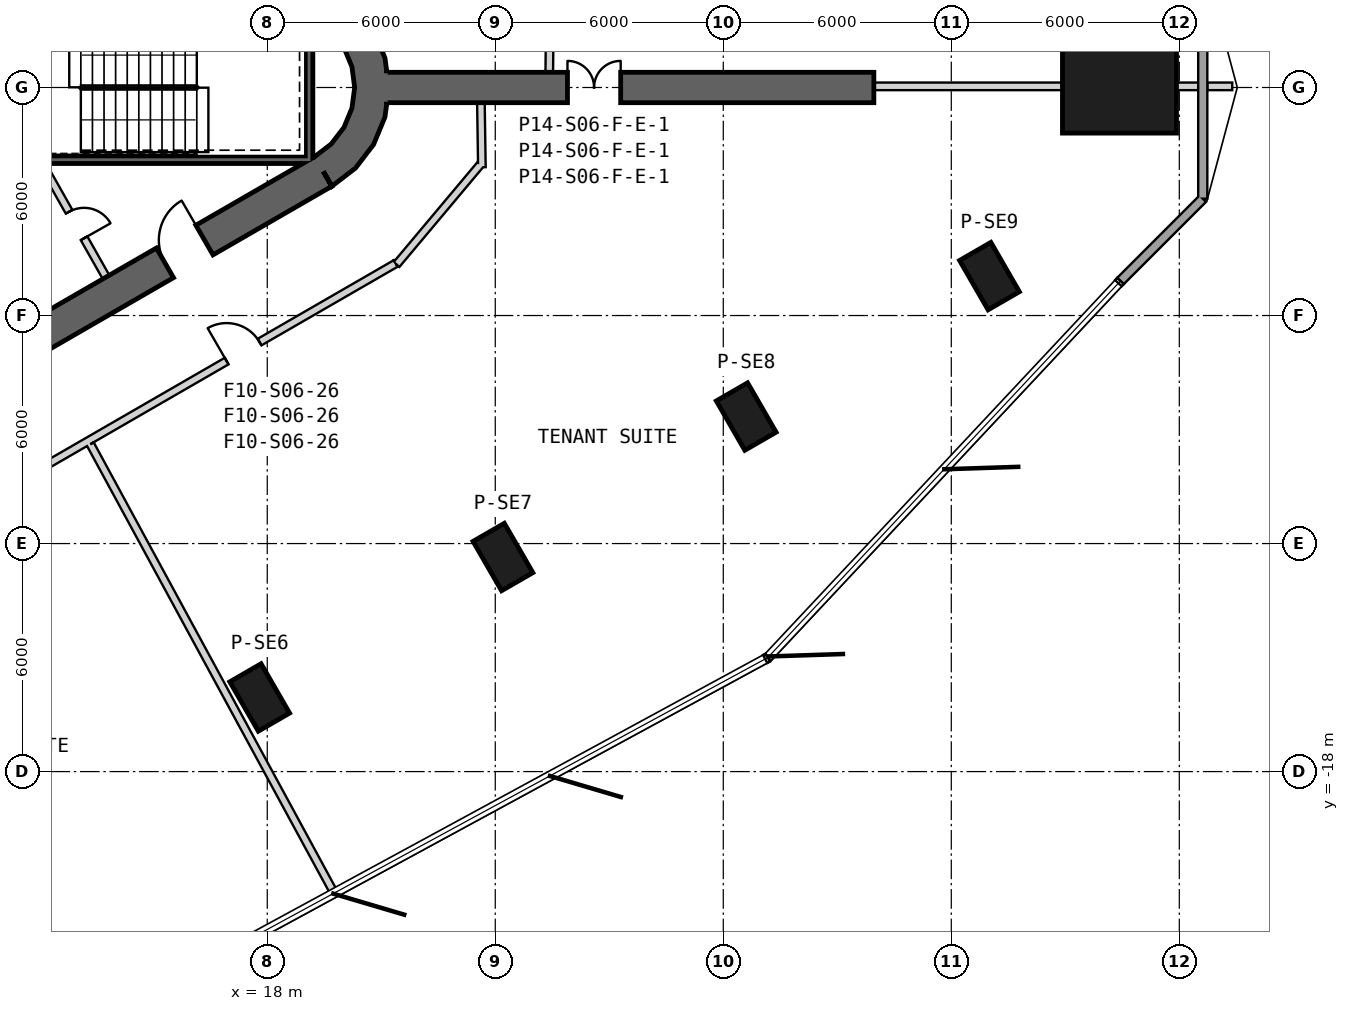
"""IFC4 building model, lengths in metres.
Left out: names, types, materials, properties, quantities, classifications, styles, units other than length and angle.
Written with IfcOpenShell. Run it as: python <this file> out.ifc"""

import sys

from ifc_helpers import new_model, si_unit, direction, frame, frame_2d, origin, origin_2d, place, context, subcontext, project, spatial, polyline, rectangle, outline, extrude, element, fill, save


model = new_model("IFC4")
c1 = context("Model", 3, precision=1e-05, world=origin(), true_north=direction((0.0, 1.0)))
c2 = subcontext(c1, "Body", "Model", "MODEL_VIEW")
j1 = project(units=[si_unit("LENGTHUNIT", "METRE"), si_unit("PLANEANGLEUNIT", "RADIAN")], contexts=[c1])
p1 = place(None, origin())
s1 = spatial("IfcSite", under=j1, at=p1, CompositionType="ELEMENT")
p2 = place(p1, origin())
s2 = spatial("IfcBuilding", under=s1, at=p2, CompositionType="ELEMENT")
p3 = place(p2, frame((0.0, 0.0, 119.3)))
s3 = spatial("IfcBuildingStorey", under=s2, at=p3, CompositionType="ELEMENT", Elevation=119.3)
p4 = place(p3, frame((40.425, 0.0, 0.0), z_axis=(0.0, 0.0, 1.0), x_axis=(1.0, 0.0, 0.0)))
e1 = element("IfcColumn", 1, at=p4, inside=s3, PredefinedType="COLUMN", context=c2, shape_type="SweptSolid", body=[
    extrude(rectangle(XDim=3.0, YDim=2.4, at=origin_2d()), origin(), (0.0, 0.0, 1.0), 4.1),
])
for number, where, z_axis, x_axis in (
    (2, (17.801, -16.05, 0.0), (0.0, 0.0, 1.0), (0.5, -0.866, 0.0)),
    (3, (24.202, -12.354, 0.0), (0.0, 0.0, 1.0), (0.5, -0.866, 0.0)),
    (4, (30.604, -8.658, 0.0), (0.0, 0.0, 1.0), (0.5, -0.866, 0.0)),
    (5, (37.005, -4.963, 0.0), (0.0, 0.0, 1.0), (0.5, -0.866, 0.0)),
):
    element("IfcColumn", number, at=place(p3, frame(where, z_axis=z_axis, x_axis=x_axis)), inside=s3, PredefinedType="COLUMN", context=c2, shape_type="SweptSolid", body=[
        extrude(rectangle(XDim=1.5, YDim=0.95, at=origin_2d()), origin(), (0.0, 0.0, 1.0), 4.1),
    ])
p5 = place(p3, frame((-7.825, -17.97, 0.0), z_axis=(0.0, 0.0, 1.0), x_axis=(0.866028369851, 0.499994862586, 0.0)))
e6 = element("IfcWall", 6, at=p5, inside=s3, PredefinedType="SHEAR", context=c2, shape_type="SweptSolid", body=[
    extrude(rectangle(XDim=31.523, YDim=0.9, at=frame_2d((15.762, 0.0))), origin(), (0.0, 0.0, 1.0), 4.1),
])
p6 = place(p5, frame((7.062, 0.0, 0.0)))
e7 = element("IfcOpeningElement", 7, at=p6, cuts=e6, PredefinedType="OPENING", context=c2, shape_type="SweptSolid", body=[
    extrude(rectangle(XDim=1.2, YDim=2.4, at=frame_2d((0.6, 1.2))), frame((0.0, 0.46, 0.0), z_axis=(0.0, -1.0, 0.0), x_axis=(1.0, 0.0, 0.0)), (0.0, 0.0, 1.0), 0.92),
])
p7 = place(p5, frame((9.762, 0.0, 0.0)))
e8 = element("IfcOpeningElement", 8, at=p7, cuts=e6, PredefinedType="OPENING", context=c2, shape_type="SweptSolid", body=[
    extrude(rectangle(XDim=1.2, YDim=2.4, at=frame_2d((0.6, 1.2))), frame((0.0, 0.46, 0.0), z_axis=(0.0, -1.0, 0.0), x_axis=(1.0, 0.0, 0.0)), (0.0, 0.0, 1.0), 0.92),
])
p8 = place(p5, frame((12.462, 0.0, 0.0)))
e9 = element("IfcOpeningElement", 9, at=p8, cuts=e6, PredefinedType="OPENING", context=c2, shape_type="SweptSolid", body=[
    extrude(rectangle(XDim=1.2, YDim=2.4, at=frame_2d((0.6, 1.2))), frame((0.0, 0.46, 0.0), z_axis=(0.0, -1.0, 0.0), x_axis=(1.0, 0.0, 0.0)), (0.0, 0.0, 1.0), 0.92),
])
p9 = place(p5, frame((15.162, 0.0, 0.0)))
e10 = element("IfcOpeningElement", 10, at=p9, cuts=e6, PredefinedType="OPENING", context=c2, shape_type="SweptSolid", body=[
    extrude(rectangle(XDim=1.2, YDim=2.4, at=frame_2d((0.6, 1.2))), frame((0.0, 0.46, 0.0), z_axis=(0.0, -1.0, 0.0), x_axis=(1.0, 0.0, 0.0)), (0.0, 0.0, 1.0), 0.92),
])
p10 = place(p5, frame((17.862, 0.0, 0.0)))
e11 = element("IfcOpeningElement", 11, at=p10, cuts=e6, PredefinedType="OPENING", context=c2, shape_type="SweptSolid", body=[
    extrude(rectangle(XDim=1.2, YDim=2.4, at=frame_2d((0.6, 1.2))), frame((0.0, 0.46, 0.0), z_axis=(0.0, -1.0, 0.0), x_axis=(1.0, 0.0, 0.0)), (0.0, 0.0, 1.0), 0.92),
])
p11 = place(p5, frame((20.562, 0.0, 0.0)))
e12 = element("IfcOpeningElement", 12, at=p11, cuts=e6, PredefinedType="OPENING", context=c2, shape_type="SweptSolid", body=[
    extrude(rectangle(XDim=1.2, YDim=2.4, at=frame_2d((0.6, 1.2))), frame((0.0, 0.46, 0.0), z_axis=(0.0, -1.0, 0.0), x_axis=(1.0, 0.0, 0.0)), (0.0, 0.0, 1.0), 0.92),
])
p12 = place(p5, frame((26.712, 0.0, 0.0)))
e13 = element("IfcOpeningElement", 13, at=p12, cuts=e6, PredefinedType="OPENING", context=c2, shape_type="SweptSolid", body=[
    extrude(rectangle(XDim=1.2, YDim=2.4, at=frame_2d((0.6, 1.2))), frame((0.0, 0.46, 0.0), z_axis=(0.0, -1.0, 0.0), x_axis=(1.0, 0.0, 0.0)), (0.0, 0.0, 1.0), 0.92),
])
p13 = place(p5, frame((3.612, 0.0, 0.0)))
e14 = element("IfcOpeningElement", 14, at=p13, cuts=e6, PredefinedType="OPENING", context=c2, shape_type="SweptSolid", body=[
    extrude(rectangle(XDim=1.2, YDim=2.4, at=frame_2d((0.6, 1.2))), frame((0.0, 0.46, 0.0), z_axis=(0.0, -1.0, 0.0), x_axis=(1.0, 0.0, 0.0)), (0.0, 0.0, 1.0), 0.92),
])
p14 = place(p3, origin())
e15 = element("IfcWall", 15, at=p14, inside=s3, PredefinedType="SHEAR", context=c2, shape_type="SweptSolid", body=[
    extrude(outline(polyline([(19.7, -2.598), (20.321, -2.121), (20.798, -1.5), (21.098, -0.777), (21.2, 0.0), (21.098, 0.777), (20.798, 1.5), (20.321, 2.121), (19.7, 2.598), (19.25, 1.819), (19.685, 1.485), (20.019, 1.05), (20.229, 0.543), (20.3, 0.0), (20.229, -0.543), (20.019, -1.05), (19.685, -1.485), (19.25, -1.819), (19.7, -2.598)])), origin(), (0.0, 0.0, 1.0), 4.1),
])
p15 = place(p3, frame((21.15, 0.0, 0.0), z_axis=(0.0, 0.0, 1.0), x_axis=(1.0, 0.0, 0.0)))
e16 = element("IfcWall", 16, at=p15, inside=s3, PredefinedType="SHEAR", context=c2, shape_type="SweptSolid", body=[
    extrude(rectangle(XDim=12.812, YDim=0.8, at=frame_2d((6.406, 0.0))), origin(), (0.0, 0.0, 1.0), 4.1),
])
p16 = place(p15, frame((4.75, 0.0, 0.0)))
e17 = element("IfcOpeningElement", 17, at=p16, cuts=e16, PredefinedType="OPENING", context=c2, shape_type="SweptSolid", body=[
    extrude(rectangle(XDim=1.4, YDim=2.4, at=frame_2d((0.7, 1.2))), frame((0.0, 0.41, 0.0), z_axis=(0.0, -1.0, 0.0), x_axis=(1.0, 0.0, 0.0)), (0.0, 0.0, 1.0), 0.82),
])
p17 = place(p3, frame((40.452, -5.091, 0.0), z_axis=(0.0, 0.0, 1.0), x_axis=(0.707106781187, 0.707106781187, 0.0)))
e18 = element("IfcWall", 18, at=p17, inside=s3, PredefinedType="SOLIDWALL", context=c2, shape_type="SweptSolid", body=[
    extrude(rectangle(XDim=3.063, YDim=0.24, at=frame_2d((1.531, 0.0))), origin(), (0.0, 0.0, 1.0), 3.8),
])
p18 = place(p3, frame((42.617, -2.925, 0.0), z_axis=(0.0, 0.0, 1.0), x_axis=(0.0, 1.0, 0.0)))
e19 = element("IfcWall", 19, at=p18, inside=s3, PredefinedType="SOLIDWALL", context=c2, shape_type="SweptSolid", body=[
    extrude(rectangle(XDim=5.851, YDim=0.24, at=frame_2d((2.925, 0.0))), origin(), (0.0, 0.0, 1.0), 3.8),
])
p19 = place(p3, frame((19.1, -2.0, -0.3), z_axis=(0.0, 0.0, 1.0), x_axis=(0.0, 1.0, 0.0)))
e20 = element("IfcWall", 20, at=p19, inside=s3, PredefinedType="SHEAR", context=c2, shape_type="SweptSolid", body=[
    extrude(rectangle(XDim=3.8, YDim=0.2, at=frame_2d((1.9, 0.0))), origin(), (0.0, 0.0, 1.0), 4.1),
])
p20 = place(p3, frame((11.1, -1.9, -0.3), z_axis=(0.0, 0.0, 1.0), x_axis=(1.0, 0.0, 0.0)))
e21 = element("IfcWall", 21, at=p20, inside=s3, PredefinedType="SHEAR", context=c2, shape_type="SweptSolid", body=[
    extrude(rectangle(XDim=7.9, YDim=0.2, at=frame_2d((3.95, 0.0))), origin(), (0.0, 0.0, 1.0), 4.1),
])
p21 = place(p3, frame((13.758, -4.99, 0.0), z_axis=(0.0, 0.0, 1.0), x_axis=(-0.491993409184, 0.87059892334, 0.0)))
e22 = element("IfcWall", 22, at=p21, inside=s3, PredefinedType="PARTITIONING", context=c2, shape_type="SweptSolid", body=[
    extrude(rectangle(XDim=3.15, YDim=0.2, at=frame_2d((1.575, 0.0))), origin(), (0.0, 0.0, 1.0), 3.8),
])
p22 = place(p21, frame((1.175, 0.0, 0.0)))
e23 = element("IfcOpeningElement", 23, at=p22, cuts=e22, PredefinedType="OPENING", context=c2, shape_type="SweptSolid", body=[
    extrude(rectangle(XDim=0.8, YDim=2.1, at=frame_2d((0.4, 1.05))), frame((0.0, 0.11, 0.0), z_axis=(0.0, -1.0, 0.0), x_axis=(1.0, 0.0, 0.0)), (0.0, 0.0, 1.0), 0.22),
])
p23 = place(p3, frame((25.421, 0.4, 0.0), z_axis=(0.0, 0.0, 1.0), x_axis=(0.011376843137, 0.999935281626, 0.0)))
e24 = element("IfcWall", 24, at=p23, inside=s3, PredefinedType="PARTITIONING", context=c2, shape_type="SweptSolid", body=[
    extrude(rectangle(XDim=2.189, YDim=0.2, at=frame_2d((1.094, 0.0))), origin(), (0.0, 0.0, 1.0), 3.8),
])
p24 = place(p3, frame((23.648, -2.098, 0.0), z_axis=(0.0, 0.0, 1.0), x_axis=(-0.015095332307, 0.99988605898, 0.0)))
e25 = element("IfcWall", 25, at=p24, inside=s3, PredefinedType="PARTITIONING", context=c2, shape_type="SweptSolid", body=[
    extrude(rectangle(XDim=1.698, YDim=0.2, at=frame_2d((0.849, 0.0))), origin(), (0.0, 0.0, 1.0), 3.8),
])
p25 = place(p3, frame((21.401, -4.657, 0.0), z_axis=(0.0, 0.0, 1.0), x_axis=(0.642796210095, 0.766037226437, 0.0)))
e26 = element("IfcWall", 26, at=p25, inside=s3, PredefinedType="PARTITIONING", context=c2, shape_type="SweptSolid", body=[
    extrude(rectangle(XDim=3.443, YDim=0.2, at=frame_2d((1.721, 0.0))), origin(), (0.0, 0.0, 1.0), 2.88),
])
p26 = place(p3, frame((-6.852, -20.93, 0.0), z_axis=(0.0, 0.0, 1.0), x_axis=(0.866023703603, 0.500002944789, 0.0)))
e27 = element("IfcWall", 27, at=p26, inside=s3, PredefinedType="PARTITIONING", context=c2, shape_type="SweptSolid", body=[
    extrude(rectangle(XDim=32.599, YDim=0.2, at=frame_2d((16.299, 0.0))), origin(), (0.0, 0.0, 1.0), 2.98),
])
p27 = place(p26, frame((27.463, 0.0, 0.0)))
e28 = element("IfcOpeningElement", 28, at=p27, cuts=e27, PredefinedType="OPENING", context=c2, shape_type="SweptSolid", body=[
    extrude(rectangle(XDim=1.0, YDim=2.1, at=frame_2d((0.5, 1.05))), frame((0.0, 0.11, 0.0), z_axis=(0.0, -1.0, 0.0), x_axis=(1.0, 0.0, 0.0)), (0.0, 0.0, 1.0), 0.22),
])
p28 = place(p26, frame((16.307, 0.0, 0.0)))
e29 = element("IfcOpeningElement", 29, at=p28, cuts=e27, PredefinedType="OPENING", context=c2, shape_type="SweptSolid", body=[
    extrude(rectangle(XDim=1.0, YDim=2.1, at=frame_2d((0.5, 1.05))), frame((0.0, 0.11, 0.0), z_axis=(0.0, -1.0, 0.0), x_axis=(1.0, 0.0, 0.0)), (0.0, 0.0, 1.0), 0.22),
])
p29 = place(p26, frame((4.694, 0.0, 0.0)))
e30 = element("IfcOpeningElement", 30, at=p29, cuts=e27, PredefinedType="OPENING", context=c2, shape_type="SweptSolid", body=[
    extrude(rectangle(XDim=1.0, YDim=2.1, at=frame_2d((0.5, 1.05))), frame((0.0, 0.11, 0.0), z_axis=(0.0, -1.0, 0.0), x_axis=(1.0, 0.0, 0.0)), (0.0, 0.0, 1.0), 0.22),
])
p30 = place(p3, frame((43.393, 0.03, 0.0), z_axis=(0.0, 0.0, 1.0), x_axis=(-1.0, 0.0, 0.0)))
e31 = element("IfcWall", 31, at=p30, inside=s3, PredefinedType="PARTITIONING", context=c2, shape_type="SweptSolid", body=[
    extrude(rectangle(XDim=0.656, YDim=0.2, at=frame_2d((0.328, 0.0))), origin(), (0.0, 0.0, 1.0), 3.8),
])
p31 = place(p3, frame((42.497, 0.03, 0.0), z_axis=(0.0, 0.0, 1.0), x_axis=(-1.0, 0.0, 0.0)))
e32 = element("IfcWall", 32, at=p31, inside=s3, PredefinedType="PARTITIONING", context=c2, shape_type="SweptSolid", body=[
    extrude(rectangle(XDim=0.572, YDim=0.2, at=frame_2d((0.286, 0.0))), origin(), (0.0, 0.0, 1.0), 3.8),
])
p32 = place(p3, frame((38.925, 0.03, 0.0), z_axis=(0.0, 0.0, 1.0), x_axis=(-1.0, 0.0, 0.0)))
e33 = element("IfcWall", 33, at=p32, inside=s3, PredefinedType="PARTITIONING", context=c2, shape_type="SweptSolid", body=[
    extrude(rectangle(XDim=4.963, YDim=0.2, at=frame_2d((2.481, 0.0))), origin(), (0.0, 0.0, 1.0), 3.37),
])
p33 = place(p3, frame((13.345, -9.385, 0.0), z_axis=(0.0, 0.0, 1.0), x_axis=(0.477273420177, -0.878754847721, 0.0)))
e34 = element("IfcWall", 34, at=p33, inside=s3, PredefinedType="PARTITIONING", context=c2, shape_type="SweptSolid", body=[
    extrude(rectangle(XDim=13.442, YDim=0.2, at=frame_2d((6.721, 0.0))), origin(), (0.0, 0.0, 1.0), 3.08),
])
p34 = place(p22, origin())
e35 = element("IfcDoor", 35, at=p34, inside=s3, OperationType="SINGLE_SWING_LEFT", PredefinedType="USERDEFINED", context=c2, shape_type="SweptSolid", body=[
    extrude(rectangle(XDim=0.8, YDim=2.1, at=frame_2d((0.4, 1.05))), frame((0.0, 0.025, 0.0), z_axis=(0.0, -1.0, 0.0), x_axis=(1.0, 0.0, 0.0)), (0.0, 0.0, 1.0), 0.05),
])
fill(e23, e35)
p35 = place(p27, origin())
e36 = element("IfcDoor", 36, at=p35, inside=s3, OperationType="SINGLE_SWING_LEFT", PredefinedType="USERDEFINED", context=c2, shape_type="SweptSolid", body=[
    extrude(rectangle(XDim=1.0, YDim=2.1, at=frame_2d((0.5, 1.05))), frame((0.0, 0.025, 0.0), z_axis=(0.0, -1.0, 0.0), x_axis=(1.0, 0.0, 0.0)), (0.0, 0.0, 1.0), 0.05),
])
fill(e28, e36)
p36 = place(p12, origin())
e37 = element("IfcDoor", 37, at=p36, inside=s3, OperationType="SINGLE_SWING_LEFT", PredefinedType="USERDEFINED", context=c2, shape_type="SweptSolid", body=[
    extrude(rectangle(XDim=1.2, YDim=2.4, at=frame_2d((0.6, 1.2))), frame((0.0, 0.025, 0.0), z_axis=(0.0, -1.0, 0.0), x_axis=(1.0, 0.0, 0.0)), (0.0, 0.0, 1.0), 0.05),
])
fill(e13, e37)
p37 = place(p16, origin())
e38 = element("IfcDoor", 38, at=p37, inside=s3, OperationType="DOUBLE_DOOR_SINGLE_SWING", PredefinedType="NOTDEFINED", context=c2, shape_type="SweptSolid", body=[
    extrude(rectangle(XDim=1.4, YDim=2.4, at=frame_2d((0.7, 1.2))), frame((0.0, 0.025, 0.0), z_axis=(0.0, -1.0, 0.0), x_axis=(1.0, 0.0, 0.0)), (0.0, 0.0, 1.0), 0.05),
])
fill(e17, e38)
save(model, sys.argv[1])
